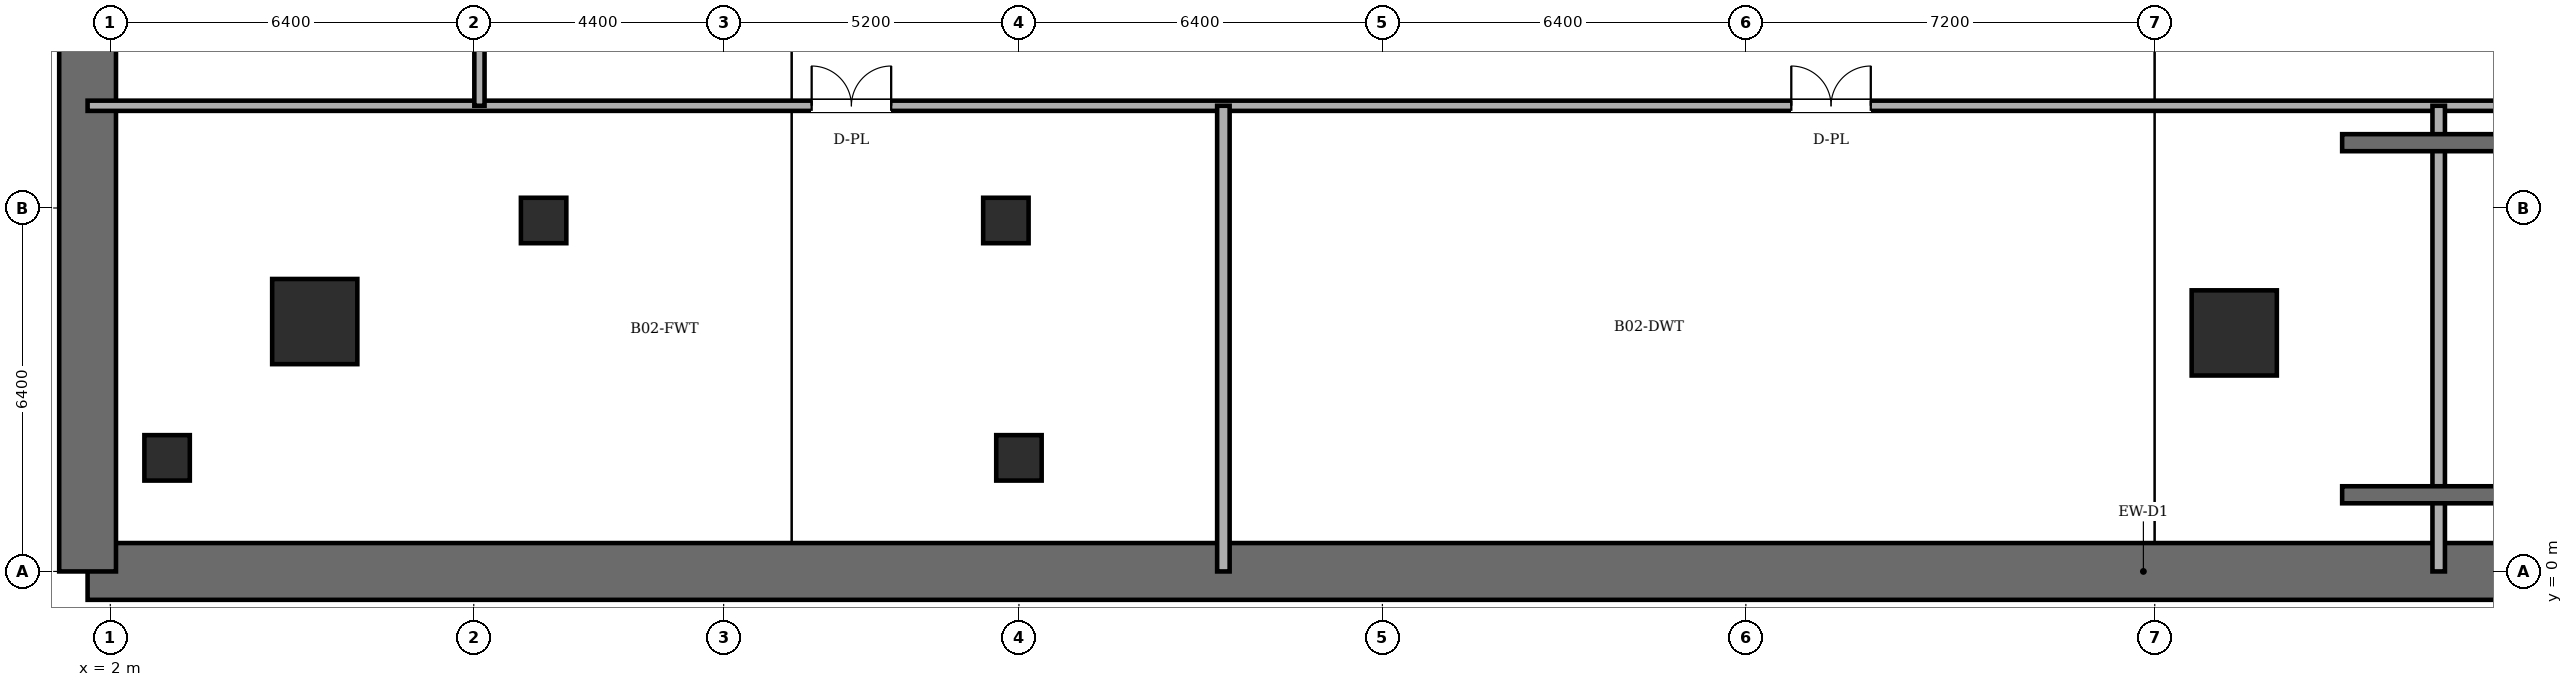
"""IFC4 building model, lengths in metres.
Left out: names, types, materials, properties, quantities, classifications, styles, units other than length and angle.
Written with IfcOpenShell. Run it as: python <this file> out.ifc"""

import sys

from ifc_helpers import new_model, si_unit, direction, frame, frame_2d, origin, origin_2d, place, context, subcontext, project, spatial, rectangle, circle, extrude, element, fill, save


model = new_model("IFC4")
c1 = context("Model", 3, precision=1e-05, world=origin(), true_north=direction((0.0, 1.0)))
c2 = subcontext(c1, "Body", "Model", "MODEL_VIEW")
j1 = project(units=[si_unit("LENGTHUNIT", "METRE"), si_unit("PLANEANGLEUNIT", "RADIAN")], contexts=[c1])
p1 = place(None, origin())
s1 = spatial("IfcSite", under=j1, at=p1, CompositionType="ELEMENT")
p2 = place(p1, origin())
s2 = spatial("IfcBuilding", under=s1, at=p2, CompositionType="ELEMENT")
p3 = place(p2, frame((0.0, 0.0, -8.4)))
s3 = spatial("IfcBuildingStorey", under=s2, at=p3, CompositionType="ELEMENT", Elevation=-8.4)
for number, where, z_axis, x_axis in (
    (1, (5.6, 4.4, 0.0), (0.0, 0.0, 1.0), (1.0, 0.0, 0.0)),
    (2, (39.4, 4.2, 0.0), (0.0, 0.0, 1.0), (1.0, 0.0, 0.0)),
):
    element("IfcColumn", number, at=place(p3, frame(where, z_axis=z_axis, x_axis=x_axis)), inside=s3, PredefinedType="COLUMN", context=c2, shape_type="SweptSolid", body=[
        extrude(circle(Radius=0.75, at=origin_2d()), origin(), (0.0, 0.0, 1.0), 4.2),
    ])
for number, where, z_axis, x_axis in (
    (3, (3.0, 2.0, 0.0), (0.0, 0.0, 1.0), (1.0, 0.0, 0.0)),
    (4, (18.0, 2.0, 0.0), (0.0, 0.0, 1.0), (1.0, 0.0, 0.0)),
    (5, (9.63, 6.18, 0.0), (0.0, 0.0, 1.0), (1.0, 0.0, 0.0)),
    (6, (17.77, 6.18, 0.0), (0.0, 0.0, 1.0), (1.0, 0.0, 0.0)),
):
    element("IfcColumn", number, at=place(p3, frame(where, z_axis=z_axis, x_axis=x_axis)), inside=s3, PredefinedType="COLUMN", context=c2, shape_type="SweptSolid", body=[
        extrude(rectangle(XDim=0.8, YDim=0.8, at=origin_2d()), origin(), (0.0, 0.0, 1.0), 4.2),
    ])
p4 = place(p3, frame((1.6, 0.0, 0.0), z_axis=(0.0, 0.0, 1.0), x_axis=(1.0, 0.0, 0.0)))
e7 = element("IfcWall", 7, at=p4, inside=s3, PredefinedType="SOLIDWALL", context=c2, shape_type="SweptSolid", body=[
    extrude(rectangle(XDim=72.4, YDim=1.0, at=frame_2d((36.2, 0.0))), origin(), (0.0, 0.0, 1.0), 3.95),
])
p5 = place(p3, frame((1.6, 48.0, 0.0), z_axis=(0.0, 0.0, 1.0), x_axis=(0.0, -1.0, 0.0)))
e8 = element("IfcWall", 8, at=p5, inside=s3, PredefinedType="SOLIDWALL", context=c2, shape_type="SweptSolid", body=[
    extrude(rectangle(XDim=48.0, YDim=1.0, at=frame_2d((24.0, 0.0))), origin(), (0.0, 0.0, 1.0), 3.95),
])
p6 = place(p3, frame((1.6, 8.2, 0.0), z_axis=(0.0, 0.0, 1.0), x_axis=(1.0, 0.0, 0.0)))
e9 = element("IfcWall", 9, at=p6, inside=s3, PredefinedType="PARTITIONING", context=c2, shape_type="SweptSolid", body=[
    extrude(rectangle(XDim=63.3, YDim=0.18, at=frame_2d((31.65, 0.0))), origin(), (0.0, 0.0, 1.0), 3.95),
])
p7 = place(p6, frame((12.75, 0.0, 0.0)))
e10 = element("IfcOpeningElement", 10, at=p7, cuts=e9, PredefinedType="OPENING", context=c2, shape_type="SweptSolid", body=[
    extrude(rectangle(XDim=1.4, YDim=2.25, at=frame_2d((0.7, 1.125))), frame((0.0, 0.1, 0.0), z_axis=(0.0, -1.0, 0.0), x_axis=(1.0, 0.0, 0.0)), (0.0, 0.0, 1.0), 0.2),
])
p8 = place(p6, frame((30.0, 0.0, 0.0)))
e11 = element("IfcOpeningElement", 11, at=p8, cuts=e9, PredefinedType="OPENING", context=c2, shape_type="SweptSolid", body=[
    extrude(rectangle(XDim=1.4, YDim=2.25, at=frame_2d((0.7, 1.125))), frame((0.0, 0.1, 0.0), z_axis=(0.0, -1.0, 0.0), x_axis=(1.0, 0.0, 0.0)), (0.0, 0.0, 1.0), 0.2),
])
p9 = place(p3, frame((8.5, 8.2, 0.0), z_axis=(0.0, 0.0, 1.0), x_axis=(0.0, 1.0, 0.0)))
e12 = element("IfcWall", 12, at=p9, inside=s3, PredefinedType="PARTITIONING", context=c2, shape_type="SweptSolid", body=[
    extrude(rectangle(XDim=39.8, YDim=0.18, at=frame_2d((19.9, 0.0))), origin(), (0.0, 0.0, 1.0), 3.95),
])
p10 = place(p9, frame((18.39, 0.0, 0.0)))
e13 = element("IfcOpeningElement", 13, at=p10, cuts=e12, PredefinedType="OPENING", context=c2, shape_type="SweptSolid", body=[
    extrude(rectangle(XDim=0.92, YDim=2.1, at=frame_2d((0.46, 1.05))), frame((0.0, 0.1, 0.0), z_axis=(0.0, -1.0, 0.0), x_axis=(1.0, 0.0, 0.0)), (0.0, 0.0, 1.0), 0.2),
])
for number, where, z_axis, x_axis in (
    (14, (21.6, 0.0, 0.0), (0.0, 0.0, 1.0), (0.0, 1.0, 0.0)),
    (15, (43.0, 0.0, 0.0), (0.0, 0.0, 1.0), (0.0, 1.0, 0.0)),
):
    element("IfcWall", number, at=place(p3, frame(where, z_axis=z_axis, x_axis=x_axis)), inside=s3, PredefinedType="PARTITIONING", context=c2, shape_type="SweptSolid", body=[
        extrude(rectangle(XDim=8.2, YDim=0.22, at=frame_2d((4.1, 0.0))), origin(), (0.0, 0.0, 1.0), 3.95),
    ])
for number, where, z_axis, x_axis in (
    (16, (41.3, 1.35, 0.0), (0.0, 0.0, 1.0), (1.0, 0.0, 0.0)),
    (17, (41.3, 7.55, 0.0), (0.0, 0.0, 1.0), (1.0, 0.0, 0.0)),
):
    element("IfcWall", number, at=place(p3, frame(where, z_axis=z_axis, x_axis=x_axis)), inside=s3, PredefinedType="SOLIDWALL", context=c2, shape_type="SweptSolid", body=[
        extrude(rectangle(XDim=4.0, YDim=0.3, at=frame_2d((2.0, 0.0))), origin(), (0.0, 0.0, 1.0), 3.95),
    ])
p11 = place(p7, origin())
e18 = element("IfcDoor", 18, at=p11, inside=s3, OperationType="DOUBLE_DOOR_SINGLE_SWING", PredefinedType="DOOR", context=c2, shape_type="SweptSolid", body=[
    extrude(rectangle(XDim=1.4, YDim=2.25, at=frame_2d((0.7, 1.125))), frame((0.0, 0.025, 0.0), z_axis=(0.0, -1.0, 0.0), x_axis=(1.0, 0.0, 0.0)), (0.0, 0.0, 1.0), 0.05),
])
fill(e10, e18)
p12 = place(p8, origin())
e19 = element("IfcDoor", 19, at=p12, inside=s3, OperationType="DOUBLE_DOOR_SINGLE_SWING", PredefinedType="DOOR", context=c2, shape_type="SweptSolid", body=[
    extrude(rectangle(XDim=1.4, YDim=2.25, at=frame_2d((0.7, 1.125))), frame((0.0, 0.025, 0.0), z_axis=(0.0, -1.0, 0.0), x_axis=(1.0, 0.0, 0.0)), (0.0, 0.0, 1.0), 0.05),
])
fill(e11, e19)
save(model, sys.argv[1])
